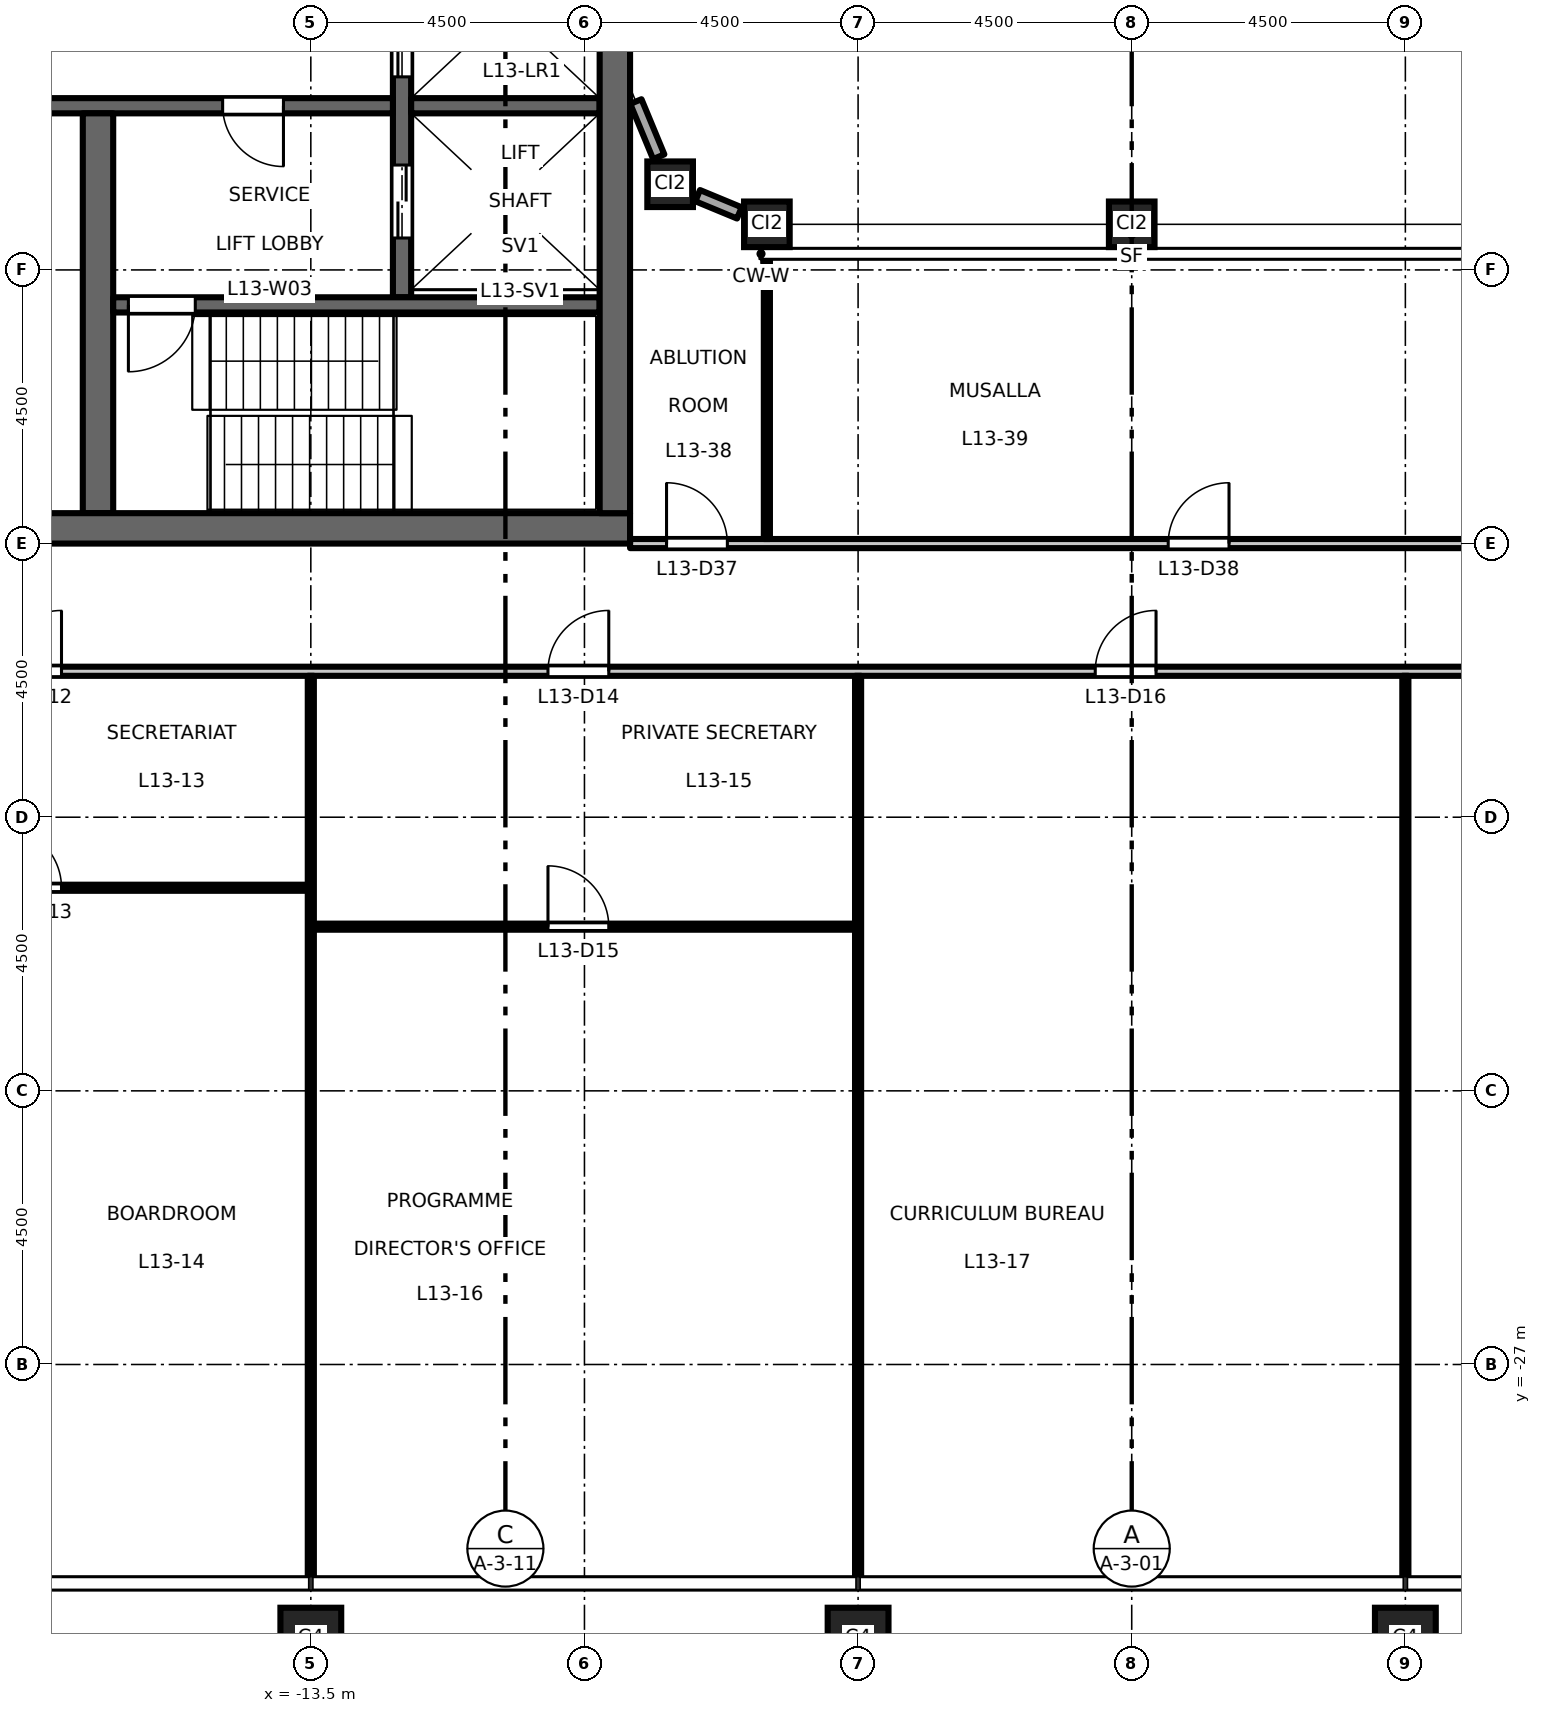
"""IFC4 building model, lengths in metres.
Left out: names, types, materials, properties, quantities, classifications, styles, units other than length and angle.
Written with IfcOpenShell. Run it as: python <this file> out.ifc"""

import sys

from ifc_helpers import new_model, si_unit, direction, frame, frame_2d, origin, origin_2d, place, context, subcontext, project, spatial, rectangle, hollow_rectangle, extrude, element, fill, save


model = new_model("IFC4")
c1 = context("Model", 3, precision=1e-05, world=origin(), true_north=direction((0.0, 1.0)))
c2 = subcontext(c1, "Body", "Model", "MODEL_VIEW")
j1 = project(units=[si_unit("LENGTHUNIT", "METRE"), si_unit("PLANEANGLEUNIT", "RADIAN")], contexts=[c1])
p1 = place(None, origin())
s1 = spatial("IfcSite", under=j1, at=p1, CompositionType="ELEMENT")
p2 = place(p1, origin())
s2 = spatial("IfcBuilding", under=s1, at=p2, CompositionType="ELEMENT")
p3 = place(p2, frame((0.0, 0.0, 62.7)))
s3 = spatial("IfcBuildingStorey", under=s2, at=p3, CompositionType="ELEMENT", Elevation=62.7)
for number, where, z_axis, x_axis in (
    (1, (-13.5, -31.5, 0.0), (0.0, 0.0, 1.0), (1.0, 0.0, 0.0)),
    (2, (-4.5, -31.5, 0.0), (0.0, 0.0, 1.0), (1.0, 0.0, 0.0)),
    (3, (4.5, -31.5, 0.0), (0.0, 0.0, 1.0), (1.0, 0.0, 0.0)),
):
    element("IfcColumn", number, at=place(p3, frame(where, z_axis=z_axis, x_axis=x_axis)), inside=s3, PredefinedType="COLUMN", context=c2, shape_type="SweptSolid", body=[
        extrude(hollow_rectangle(XDim=1.0, YDim=1.0, WallThickness=0.06, at=origin_2d()), origin(), (0.0, 0.0, 1.0), 4.5),
    ])
for number, where, z_axis, x_axis in (
    (4, (-7.591, -7.591, 0.0), (0.0, 0.0, 1.0), (1.0, 0.0, 0.0)),
    (5, (-6.0, -8.25, 0.0), (0.0, 0.0, 1.0), (1.0, 0.0, 0.0)),
    (6, (0.0, -8.25, 0.0), (0.0, 0.0, 1.0), (1.0, 0.0, 0.0)),
):
    element("IfcColumn", number, at=place(p3, frame(where, z_axis=z_axis, x_axis=x_axis)), inside=s3, PredefinedType="COLUMN", context=c2, shape_type="SweptSolid", body=[
        extrude(hollow_rectangle(XDim=0.75, YDim=0.75, WallThickness=0.045, at=origin_2d()), origin(), (0.0, 0.0, 1.0), 4.5),
    ])
p4 = place(p3, frame((-12.0, -9.45, 0.0), z_axis=(0.0, 0.0, 1.0), x_axis=(0.0, 1.0, 0.0)))
e7 = element("IfcWall", 7, at=p4, inside=s3, PredefinedType="SHEAR", context=c2, shape_type="SweptSolid", body=[
    extrude(rectangle(XDim=18.9, YDim=0.3, at=frame_2d((9.45, 0.0))), origin(), (0.0, 0.0, 1.0), 4.35),
])
p5 = place(p4, frame((3.625, 0.0, 0.0)))
e8 = element("IfcOpeningElement", 8, at=p5, cuts=e7, PredefinedType="OPENING", context=c2, shape_type="SweptSolid", body=[
    extrude(rectangle(XDim=1.1, YDim=2.1, at=frame_2d((0.55, 1.05))), frame((0.0, 0.16, 0.0), z_axis=(0.0, -1.0, 0.0), x_axis=(1.0, 0.0, 0.0)), (0.0, 0.0, 1.0), 0.32),
])
p6 = place(p4, frame((6.775, 0.0, 0.0)))
e9 = element("IfcOpeningElement", 9, at=p6, cuts=e7, PredefinedType="OPENING", context=c2, shape_type="SweptSolid", body=[
    extrude(rectangle(XDim=1.1, YDim=2.1, at=frame_2d((0.55, 1.05))), frame((0.0, 0.16, 0.0), z_axis=(0.0, -1.0, 0.0), x_axis=(1.0, 0.0, 0.0)), (0.0, 0.0, 1.0), 0.32),
])
p7 = place(p4, frame((9.925, 0.0, 0.0)))
e10 = element("IfcOpeningElement", 10, at=p7, cuts=e7, PredefinedType="OPENING", context=c2, shape_type="SweptSolid", body=[
    extrude(rectangle(XDim=1.1, YDim=2.1, at=frame_2d((0.55, 1.05))), frame((0.0, 0.16, 0.0), z_axis=(0.0, -1.0, 0.0), x_axis=(1.0, 0.0, 0.0)), (0.0, 0.0, 1.0), 0.32),
])
p8 = place(p4, frame((13.075, 0.0, 0.0)))
e11 = element("IfcOpeningElement", 11, at=p8, cuts=e7, PredefinedType="OPENING", context=c2, shape_type="SweptSolid", body=[
    extrude(rectangle(XDim=1.1, YDim=2.1, at=frame_2d((0.55, 1.05))), frame((0.0, 0.16, 0.0), z_axis=(0.0, -1.0, 0.0), x_axis=(1.0, 0.0, 0.0)), (0.0, 0.0, 1.0), 0.32),
])
p9 = place(p4, frame((16.725, 0.0, 0.0)))
e12 = element("IfcOpeningElement", 12, at=p9, cuts=e7, PredefinedType="OPENING", context=c2, shape_type="SweptSolid", body=[
    extrude(rectangle(XDim=1.2, YDim=2.1, at=frame_2d((0.6, 1.05))), frame((0.0, 0.16, 0.0), z_axis=(0.0, -1.0, 0.0), x_axis=(1.0, 0.0, 0.0)), (0.0, 0.0, 1.0), 0.32),
])
p10 = place(p4, frame((0.975, 0.0, 0.0)))
e13 = element("IfcOpeningElement", 13, at=p10, cuts=e7, PredefinedType="OPENING", context=c2, shape_type="SweptSolid", body=[
    extrude(rectangle(XDim=1.2, YDim=2.1, at=frame_2d((0.6, 1.05))), frame((0.0, 0.16, 0.0), z_axis=(0.0, -1.0, 0.0), x_axis=(1.0, 0.0, 0.0)), (0.0, 0.0, 1.0), 0.32),
])
p11 = place(p3, frame((-12.15, -6.3, 0.0), z_axis=(0.0, 0.0, 1.0), x_axis=(-1.0, 0.0, 0.0)))
e14 = element("IfcWall", 14, at=p11, inside=s3, PredefinedType="SHEAR", context=c2, shape_type="SweptSolid", body=[
    extrude(rectangle(XDim=9.1, YDim=0.25, at=frame_2d((4.55, 0.0))), origin(), (0.0, 0.0, 1.0), 4.35),
])
p12 = place(p11, frame((1.8, 0.0, 0.0)))
e15 = element("IfcOpeningElement", 15, at=p12, cuts=e14, PredefinedType="OPENING", context=c2, shape_type="SweptSolid", body=[
    extrude(rectangle(XDim=1.0, YDim=2.1, at=frame_2d((0.5, 1.05))), frame((0.0, 0.135, 0.0), z_axis=(0.0, -1.0, 0.0), x_axis=(1.0, 0.0, 0.0)), (0.0, 0.0, 1.0), 0.27),
])
p13 = place(p11, frame((6.65, 0.0, 0.0)))
e16 = element("IfcOpeningElement", 16, at=p13, cuts=e14, PredefinedType="OPENING", context=c2, shape_type="SweptSolid", body=[
    extrude(rectangle(XDim=0.9, YDim=2.1, at=frame_2d((0.45, 1.05))), frame((0.0, 0.135, 0.0), z_axis=(0.0, -1.0, 0.0), x_axis=(1.0, 0.0, 0.0)), (0.0, 0.0, 1.0), 0.27),
])
p14 = place(p3, frame((-17.0, -13.0, 0.0), z_axis=(0.0, 0.0, 1.0), x_axis=(0.0, 1.0, 0.0)))
e17 = element("IfcWall", 17, at=p14, inside=s3, PredefinedType="SHEAR", context=c2, shape_type="SweptSolid", body=[
    extrude(rectangle(XDim=6.575, YDim=0.5, at=frame_2d((3.288, 0.0))), origin(), (0.0, 0.0, 1.0), 4.35),
])
p15 = place(p3, frame((-8.75, -6.3, 0.0), z_axis=(0.0, 0.0, 1.0), x_axis=(-1.0, 0.0, 0.0)))
e18 = element("IfcWall", 18, at=p15, inside=s3, PredefinedType="SHEAR", context=c2, shape_type="SweptSolid", body=[
    extrude(rectangle(XDim=3.1, YDim=0.25, at=frame_2d((1.55, 0.0))), origin(), (0.0, 0.0, 1.0), 4.35),
])
p16 = place(p3, frame((-8.75, -9.575, 0.0), z_axis=(0.0, 0.0, 1.0), x_axis=(-1.0, 0.0, 0.0)))
e19 = element("IfcWall", 19, at=p16, inside=s3, PredefinedType="SHEAR", context=c2, shape_type="SweptSolid", body=[
    extrude(rectangle(XDim=8.0, YDim=0.25, at=frame_2d((4.0, 0.0))), origin(), (0.0, 0.0, 1.0), 4.35),
])
p17 = place(p16, frame((6.65, 0.0, 0.0)))
e20 = element("IfcOpeningElement", 20, at=p17, cuts=e19, PredefinedType="OPENING", context=c2, shape_type="SweptSolid", body=[
    extrude(rectangle(XDim=1.1, YDim=2.1, at=frame_2d((0.55, 1.05))), frame((0.0, 0.135, 0.0), z_axis=(0.0, -1.0, 0.0), x_axis=(1.0, 0.0, 0.0)), (0.0, 0.0, 1.0), 0.27),
])
p18 = place(p3, frame((-8.25, -13.25, 0.0), z_axis=(0.0, 0.0, 1.0), x_axis=(-1.0, 0.0, 0.0)))
e21 = element("IfcWall", 21, at=p18, inside=s3, PredefinedType="SHEAR", context=c2, shape_type="SweptSolid", body=[
    extrude(rectangle(XDim=13.5, YDim=0.5, at=frame_2d((6.75, 0.0))), origin(), (0.0, 0.0, 1.0), 4.35),
])
p19 = place(p3, frame((-8.5, -13.0, 0.0), z_axis=(0.0, 0.0, 1.0), x_axis=(0.0, 1.0, 0.0)))
e22 = element("IfcWall", 22, at=p19, inside=s3, PredefinedType="SHEAR", context=c2, shape_type="SweptSolid", body=[
    extrude(rectangle(XDim=26.0, YDim=0.5, at=frame_2d((13.0, 0.0))), origin(), (0.0, 0.0, 1.0), 4.35),
])
p20 = place(p3, frame((-8.154, -6.231, 0.0), z_axis=(0.0, 0.0, 1.0), x_axis=(0.382549378284, -0.923935048136, 0.0)))
e23 = element("IfcWall", 23, at=p20, inside=s3, PredefinedType="STANDARD", context=c2, shape_type="SweptSolid", body=[
    extrude(rectangle(XDim=0.982, YDim=0.2, at=frame_2d((0.491, 0.0))), origin(), (0.0, 0.0, 1.0), 3.73),
])
p21 = place(p3, frame((-7.138, -7.779, 0.0), z_axis=(0.0, 0.0, 1.0), x_axis=(0.923940677943, -0.382535780864, 0.0)))
e24 = element("IfcWall", 24, at=p21, inside=s3, PredefinedType="STANDARD", context=c2, shape_type="SweptSolid", body=[
    extrude(rectangle(XDim=0.742, YDim=0.2, at=frame_2d((0.371, 0.0))), origin(), (0.0, 0.0, 1.0), 3.73),
])
p22 = place(p3, frame((-13.45, -19.8, 0.0), z_axis=(0.0, 0.0, 1.0), x_axis=(1.0, 0.0, 0.0)))
e25 = element("IfcWall", 25, at=p22, inside=s3, PredefinedType="PARTITIONING", context=c2, shape_type="SweptSolid", body=[
    extrude(rectangle(XDim=8.9, YDim=0.1, at=frame_2d((4.45, 0.0))), origin(), (0.0, 0.0, 1.0), 4.35),
])
p23 = place(p22, frame((3.85, 0.0, 0.0)))
e26 = element("IfcOpeningElement", 26, at=p23, cuts=e25, PredefinedType="OPENING", context=c2, shape_type="SweptSolid", body=[
    extrude(rectangle(XDim=1.0, YDim=2.1, at=frame_2d((0.5, 1.05))), frame((0.0, 0.06, 0.0), z_axis=(0.0, -1.0, 0.0), x_axis=(1.0, 0.0, 0.0)), (0.0, 0.0, 1.0), 0.12),
])
p24 = place(p3, frame((-22.45, -19.16, 0.0), z_axis=(0.0, 0.0, 1.0), x_axis=(1.0, 0.0, 0.0)))
e27 = element("IfcWall", 27, at=p24, inside=s3, PredefinedType="PARTITIONING", context=c2, shape_type="SweptSolid", body=[
    extrude(rectangle(XDim=8.9, YDim=0.1, at=frame_2d((4.45, 0.0))), origin(), (0.0, 0.0, 1.0), 4.35),
])
p25 = place(p24, frame((3.85, 0.0, 0.0)))
e28 = element("IfcOpeningElement", 28, at=p25, cuts=e27, PredefinedType="OPENING", context=c2, shape_type="SweptSolid", body=[
    extrude(rectangle(XDim=1.0, YDim=2.1, at=frame_2d((0.5, 1.05))), frame((0.0, 0.06, 0.0), z_axis=(0.0, -1.0, 0.0), x_axis=(1.0, 0.0, 0.0)), (0.0, 0.0, 1.0), 0.12),
])
p26 = place(p3, frame((-23.925, -15.6, 0.0), z_axis=(0.0, 0.0, 1.0), x_axis=(1.0, 0.0, 0.0)))
e29 = element("IfcWall", 29, at=p26, inside=s3, PredefinedType="PARTITIONING", context=c2, shape_type="SweptSolid", body=[
    extrude(rectangle(XDim=47.85, YDim=0.15, at=frame_2d((23.925, 0.0))), origin(), (0.0, 0.0, 1.0), 4.35),
])
p27 = place(p26, frame((5.325, 0.0, 0.0)))
e30 = element("IfcOpeningElement", 30, at=p27, cuts=e29, PredefinedType="OPENING", context=c2, shape_type="SweptSolid", body=[
    extrude(rectangle(XDim=1.0, YDim=2.1, at=frame_2d((0.5, 1.05))), frame((0.0, 0.085, 0.0), z_axis=(0.0, -1.0, 0.0), x_axis=(1.0, 0.0, 0.0)), (0.0, 0.0, 1.0), 0.17),
])
p28 = place(p26, frame((14.325, 0.0, 0.0)))
e31 = element("IfcOpeningElement", 31, at=p28, cuts=e29, PredefinedType="OPENING", context=c2, shape_type="SweptSolid", body=[
    extrude(rectangle(XDim=1.0, YDim=2.1, at=frame_2d((0.5, 1.05))), frame((0.0, 0.085, 0.0), z_axis=(0.0, -1.0, 0.0), x_axis=(1.0, 0.0, 0.0)), (0.0, 0.0, 1.0), 0.17),
])
p29 = place(p26, frame((23.325, 0.0, 0.0)))
e32 = element("IfcOpeningElement", 32, at=p29, cuts=e29, PredefinedType="OPENING", context=c2, shape_type="SweptSolid", body=[
    extrude(rectangle(XDim=1.0, YDim=2.1, at=frame_2d((0.5, 1.05))), frame((0.0, 0.085, 0.0), z_axis=(0.0, -1.0, 0.0), x_axis=(1.0, 0.0, 0.0)), (0.0, 0.0, 1.0), 0.17),
])
p30 = place(p26, frame((32.325, 0.0, 0.0)))
e33 = element("IfcOpeningElement", 33, at=p30, cuts=e29, PredefinedType="OPENING", context=c2, shape_type="SweptSolid", body=[
    extrude(rectangle(XDim=1.0, YDim=2.1, at=frame_2d((0.5, 1.05))), frame((0.0, 0.085, 0.0), z_axis=(0.0, -1.0, 0.0), x_axis=(1.0, 0.0, 0.0)), (0.0, 0.0, 1.0), 0.17),
])
p31 = place(p26, frame((41.325, 0.0, 0.0)))
e34 = element("IfcOpeningElement", 34, at=p31, cuts=e29, PredefinedType="OPENING", context=c2, shape_type="SweptSolid", body=[
    extrude(rectangle(XDim=1.0, YDim=2.1, at=frame_2d((0.5, 1.05))), frame((0.0, 0.085, 0.0), z_axis=(0.0, -1.0, 0.0), x_axis=(1.0, 0.0, 0.0)), (0.0, 0.0, 1.0), 0.17),
])
p32 = place(p3, frame((-8.25, -13.5, 0.0), z_axis=(0.0, 0.0, 1.0), x_axis=(1.0, 0.0, 0.0)))
e35 = element("IfcWall", 35, at=p32, inside=s3, PredefinedType="PARTITIONING", context=c2, shape_type="SweptSolid", body=[
    extrude(rectangle(XDim=16.5, YDim=0.15, at=frame_2d((8.25, 0.0))), origin(), (0.0, 0.0, 1.0), 3.85),
])
p33 = place(p32, frame((0.6, 0.0, 0.0)))
e36 = element("IfcOpeningElement", 36, at=p33, cuts=e35, PredefinedType="OPENING", context=c2, shape_type="SweptSolid", body=[
    extrude(rectangle(XDim=1.0, YDim=2.1, at=frame_2d((0.5, 1.05))), frame((0.0, 0.085, 0.0), z_axis=(0.0, -1.0, 0.0), x_axis=(1.0, 0.0, 0.0)), (0.0, 0.0, 1.0), 0.17),
])
p34 = place(p32, frame((8.85, 0.0, 0.0)))
e37 = element("IfcOpeningElement", 37, at=p34, cuts=e35, PredefinedType="OPENING", context=c2, shape_type="SweptSolid", body=[
    extrude(rectangle(XDim=1.0, YDim=2.1, at=frame_2d((0.5, 1.05))), frame((0.0, 0.085, 0.0), z_axis=(0.0, -1.0, 0.0), x_axis=(1.0, 0.0, 0.0)), (0.0, 0.0, 1.0), 0.17),
])
p35 = place(p3, frame((-13.5, -30.51, 0.0), z_axis=(0.0, 0.0, 1.0), x_axis=(0.0, 1.0, 0.0)))
e38 = element("IfcWall", 38, at=p35, inside=s3, PredefinedType="PARTITIONING", context=c2, shape_type="SweptSolid", body=[
    extrude(rectangle(XDim=14.835, YDim=0.1, at=frame_2d((7.417, 0.0))), origin(), (0.0, 0.0, 1.0), 3.35),
])
p36 = place(p3, frame((-6.0, -13.425, 0.0), z_axis=(0.0, 0.0, 1.0), x_axis=(0.0, 1.0, 0.0)))
e39 = element("IfcWall", 39, at=p36, inside=s3, PredefinedType="PARTITIONING", context=c2, shape_type="SweptSolid", body=[
    extrude(rectangle(XDim=4.725, YDim=0.1, at=frame_2d((2.363, 0.0))), origin(), (0.0, 0.0, 1.0), 4.35),
])
for number, where, z_axis, x_axis in (
    (40, (-4.5, -30.51, 0.0), (0.0, 0.0, 1.0), (0.0, 1.0, 0.0)),
    (41, (4.5, -30.51, 0.0), (0.0, 0.0, 1.0), (0.0, 1.0, 0.0)),
):
    element("IfcWall", number, at=place(p3, frame(where, z_axis=z_axis, x_axis=x_axis)), inside=s3, PredefinedType="PARTITIONING", context=c2, shape_type="SweptSolid", body=[
        extrude(rectangle(XDim=14.835, YDim=0.1, at=frame_2d((7.417, 0.0))), origin(), (0.0, 0.0, 1.0), 3.35),
    ])
p37 = place(p12, origin())
e42 = element("IfcDoor", 42, at=p37, inside=s3, OperationType="SINGLE_SWING_RIGHT", PredefinedType="DOOR", context=c2, shape_type="SweptSolid", body=[
    extrude(rectangle(XDim=1.0, YDim=2.1, at=frame_2d((0.5, 1.05))), frame((0.0, 0.025, 0.0), z_axis=(0.0, -1.0, 0.0), x_axis=(1.0, 0.0, 0.0)), (0.0, 0.0, 1.0), 0.05),
])
fill(e15, e42)
p38 = place(p17, origin())
e43 = element("IfcDoor", 43, at=p38, inside=s3, OperationType="SINGLE_SWING_LEFT", PredefinedType="DOOR", context=c2, shape_type="SweptSolid", body=[
    extrude(rectangle(XDim=1.1, YDim=2.1, at=frame_2d((0.55, 1.05))), frame((0.0, 0.025, 0.0), z_axis=(0.0, -1.0, 0.0), x_axis=(1.0, 0.0, 0.0)), (0.0, 0.0, 1.0), 0.05),
])
fill(e20, e43)
p39 = place(p5, origin())
e44 = element("IfcDoor", 44, at=p39, inside=s3, OperationType="DOUBLE_DOOR_SLIDING", PredefinedType="DOOR", context=c2, shape_type="SweptSolid", body=[
    extrude(rectangle(XDim=1.1, YDim=2.1, at=frame_2d((0.55, 1.05))), frame((0.0, 0.025, 0.0), z_axis=(0.0, -1.0, 0.0), x_axis=(1.0, 0.0, 0.0)), (0.0, 0.0, 1.0), 0.05),
])
fill(e8, e44)
p40 = place(p10, origin())
e45 = element("IfcDoor", 45, at=p40, inside=s3, OperationType="DOUBLE_DOOR_SLIDING", PredefinedType="DOOR", context=c2, shape_type="SweptSolid", body=[
    extrude(rectangle(XDim=1.2, YDim=2.1, at=frame_2d((0.6, 1.05))), frame((0.0, 0.025, 0.0), z_axis=(0.0, -1.0, 0.0), x_axis=(1.0, 0.0, 0.0)), (0.0, 0.0, 1.0), 0.05),
])
fill(e13, e45)
p41 = place(p27, origin())
e46 = element("IfcDoor", 46, at=p41, inside=s3, OperationType="SINGLE_SWING_RIGHT", PredefinedType="DOOR", context=c2, shape_type="SweptSolid", body=[
    extrude(rectangle(XDim=1.0, YDim=2.1, at=frame_2d((0.5, 1.05))), frame((0.0, 0.025, 0.0), z_axis=(0.0, -1.0, 0.0), x_axis=(1.0, 0.0, 0.0)), (0.0, 0.0, 1.0), 0.05),
])
fill(e30, e46)
p42 = place(p25, origin())
e47 = element("IfcDoor", 47, at=p42, inside=s3, OperationType="SINGLE_SWING_LEFT", PredefinedType="DOOR", context=c2, shape_type="SweptSolid", body=[
    extrude(rectangle(XDim=1.0, YDim=2.1, at=frame_2d((0.5, 1.05))), frame((0.0, 0.025, 0.0), z_axis=(0.0, -1.0, 0.0), x_axis=(1.0, 0.0, 0.0)), (0.0, 0.0, 1.0), 0.05),
])
fill(e28, e47)
p43 = place(p28, origin())
e48 = element("IfcDoor", 48, at=p43, inside=s3, OperationType="SINGLE_SWING_RIGHT", PredefinedType="DOOR", context=c2, shape_type="SweptSolid", body=[
    extrude(rectangle(XDim=1.0, YDim=2.1, at=frame_2d((0.5, 1.05))), frame((0.0, 0.025, 0.0), z_axis=(0.0, -1.0, 0.0), x_axis=(1.0, 0.0, 0.0)), (0.0, 0.0, 1.0), 0.05),
])
fill(e31, e48)
p44 = place(p23, origin())
e49 = element("IfcDoor", 49, at=p44, inside=s3, OperationType="SINGLE_SWING_LEFT", PredefinedType="DOOR", context=c2, shape_type="SweptSolid", body=[
    extrude(rectangle(XDim=1.0, YDim=2.1, at=frame_2d((0.5, 1.05))), frame((0.0, 0.025, 0.0), z_axis=(0.0, -1.0, 0.0), x_axis=(1.0, 0.0, 0.0)), (0.0, 0.0, 1.0), 0.05),
])
fill(e26, e49)
p45 = place(p29, origin())
e50 = element("IfcDoor", 50, at=p45, inside=s3, OperationType="SINGLE_SWING_RIGHT", PredefinedType="DOOR", context=c2, shape_type="SweptSolid", body=[
    extrude(rectangle(XDim=1.0, YDim=2.1, at=frame_2d((0.5, 1.05))), frame((0.0, 0.025, 0.0), z_axis=(0.0, -1.0, 0.0), x_axis=(1.0, 0.0, 0.0)), (0.0, 0.0, 1.0), 0.05),
])
fill(e32, e50)
p46 = place(p33, origin())
e51 = element("IfcDoor", 51, at=p46, inside=s3, OperationType="SINGLE_SWING_LEFT", PredefinedType="DOOR", context=c2, shape_type="SweptSolid", body=[
    extrude(rectangle(XDim=1.0, YDim=2.1, at=frame_2d((0.5, 1.05))), frame((0.0, 0.025, 0.0), z_axis=(0.0, -1.0, 0.0), x_axis=(1.0, 0.0, 0.0)), (0.0, 0.0, 1.0), 0.05),
])
fill(e36, e51)
p47 = place(p34, origin())
e52 = element("IfcDoor", 52, at=p47, inside=s3, OperationType="SINGLE_SWING_RIGHT", PredefinedType="DOOR", context=c2, shape_type="SweptSolid", body=[
    extrude(rectangle(XDim=1.0, YDim=2.1, at=frame_2d((0.5, 1.05))), frame((0.0, 0.025, 0.0), z_axis=(0.0, -1.0, 0.0), x_axis=(1.0, 0.0, 0.0)), (0.0, 0.0, 1.0), 0.05),
])
fill(e37, e52)
save(model, sys.argv[1])
